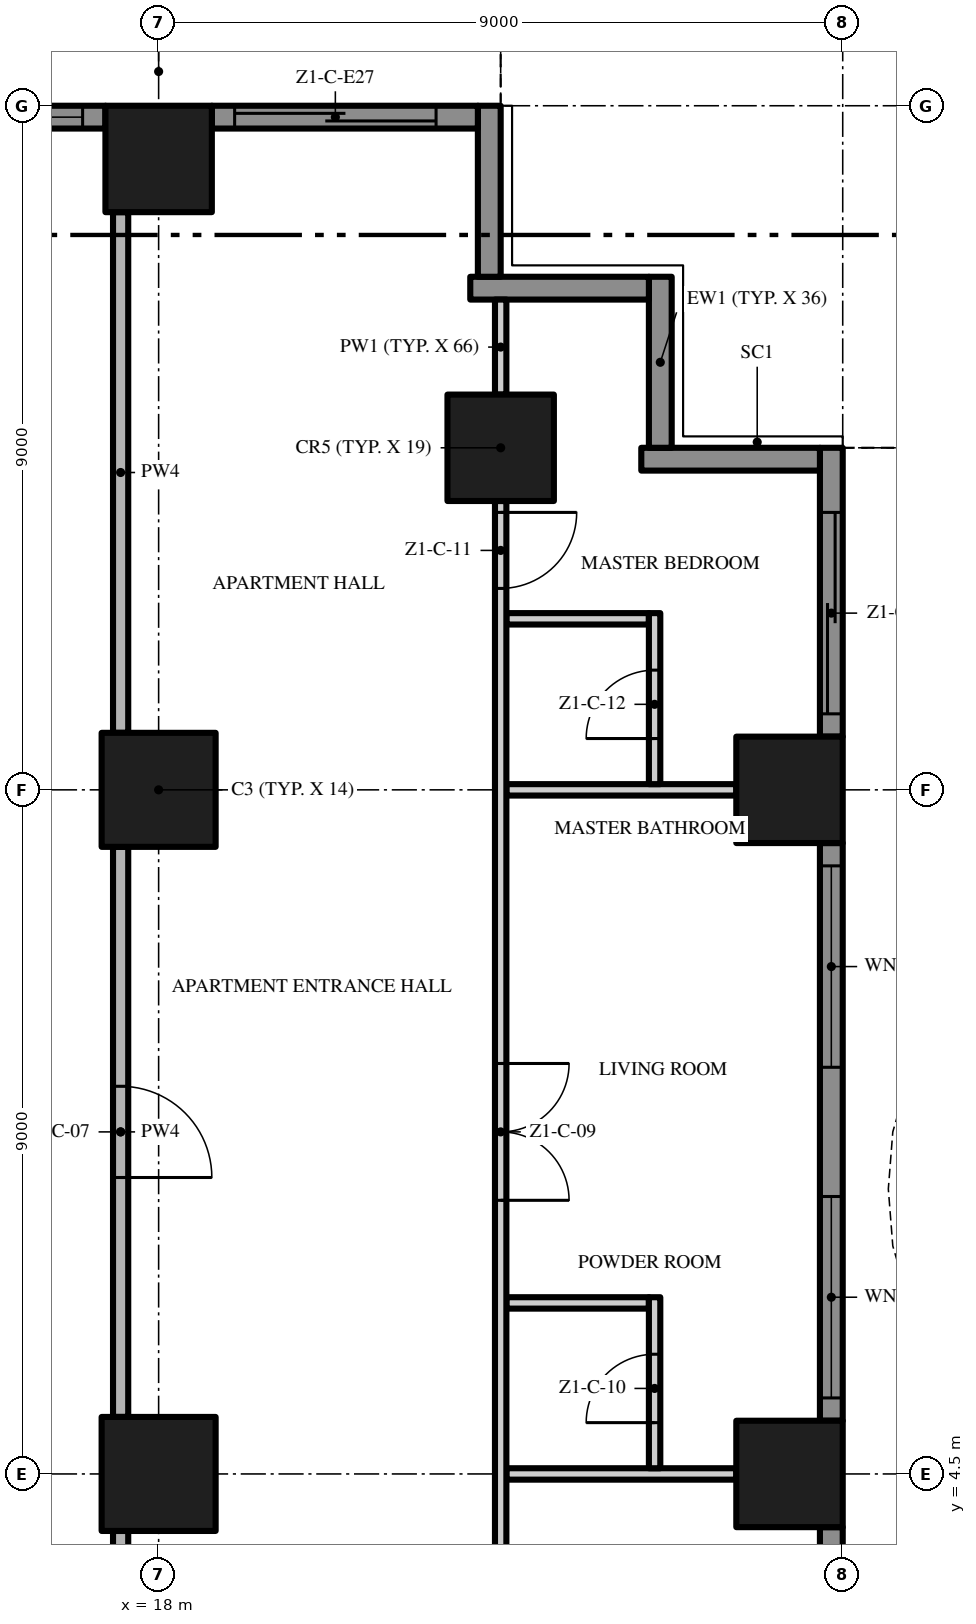
"""IFC4 building model, lengths in metres.
Left out: names, types, materials, properties, quantities, classifications, styles, units other than length and angle.
Written with IfcOpenShell. Run it as: python <this file> out.ifc"""

import sys

from ifc_helpers import new_model, si_unit, direction, frame, frame_2d, origin, origin_2d, place, context, subcontext, project, spatial, polyline, rectangle, outline, extrude, element, fill, save


model = new_model("IFC4")
c1 = context("Model", 3, precision=1e-05, world=origin(), true_north=direction((0.0, 1.0)))
c2 = subcontext(c1, "Body", "Model", "MODEL_VIEW")
j1 = project(units=[si_unit("LENGTHUNIT", "METRE"), si_unit("PLANEANGLEUNIT", "RADIAN")], contexts=[c1])
p1 = place(None, origin())
s1 = spatial("IfcSite", under=j1, at=p1, CompositionType="ELEMENT")
p2 = place(p1, origin())
s2 = spatial("IfcBuilding", under=s1, at=p2, CompositionType="ELEMENT")
p3 = place(p2, frame((0.0, 0.0, 45.4)))
s3 = spatial("IfcBuildingStorey", under=s2, at=p3, CompositionType="ELEMENT", Elevation=45.4)
p4 = place(p3, frame((18.0, 13.5, 0.0), z_axis=(0.0, 0.0, 1.0), x_axis=(1.0, 0.0, 0.0)))
e1 = element("IfcColumn", 1, at=p4, inside=s3, PredefinedType="COLUMN", context=c2, shape_type="SweptSolid", body=[
    extrude(rectangle(XDim=1.5, YDim=1.5, at=origin_2d()), origin(), (0.0, 0.0, 1.0), 3.5),
])
p5 = place(p3, frame((18.0, 21.8, 0.0), z_axis=(0.0, 0.0, 1.0), x_axis=(1.0, 0.0, 0.0)))
e2 = element("IfcColumn", 2, at=p5, inside=s3, PredefinedType="COLUMN", context=c2, shape_type="SweptSolid", body=[
    extrude(rectangle(XDim=1.4, YDim=1.4, at=origin_2d()), origin(), (0.0, 0.0, 1.0), 3.5),
])
p6 = place(p3, frame((18.0, 4.5, 0.0), z_axis=(0.0, 0.0, 1.0), x_axis=(1.0, 0.0, 0.0)))
e3 = element("IfcColumn", 3, at=p6, inside=s3, PredefinedType="COLUMN", context=c2, shape_type="SweptSolid", body=[
    extrude(rectangle(XDim=1.5, YDim=1.5, at=origin_2d()), origin(), (0.0, 0.0, 1.0), 3.5),
])
for number, where, z_axis, x_axis in (
    (4, (26.3, 13.5, 0.0), (0.0, 0.0, 1.0), (1.0, 0.0, 0.0)),
    (5, (22.5, 18.0, 0.0), (0.0, 0.0, 1.0), (1.0, 0.0, 0.0)),
    (6, (26.3, 4.5, 0.0), (0.0, 0.0, 1.0), (1.0, 0.0, 0.0)),
):
    element("IfcColumn", number, at=place(p3, frame(where, z_axis=z_axis, x_axis=x_axis)), inside=s3, PredefinedType="COLUMN", context=c2, shape_type="SweptSolid", body=[
        extrude(rectangle(XDim=1.4, YDim=1.4, at=origin_2d()), origin(), (0.0, 0.0, 1.0), 3.5),
    ])
p7 = place(p3, frame((26.85, 3.8, 0.0), z_axis=(0.0, 0.0, 1.0), x_axis=(0.0, -1.0, 0.0)))
e7 = element("IfcWall", 7, at=p7, inside=s3, PredefinedType="SOLIDWALL", context=c2, shape_type="SweptSolid", body=[
    extrude(rectangle(XDim=7.6, YDim=0.3, at=frame_2d((3.8, 0.0))), origin(), (0.0, 0.0, 1.0), 3.5),
])
p8 = place(p7, frame((4.65, 0.0, 0.45)))
e8 = element("IfcOpeningElement", 8, at=p8, cuts=e7, PredefinedType="OPENING", context=c2, shape_type="SweptSolid", body=[
    extrude(rectangle(XDim=2.65, YDim=2.65, at=frame_2d((1.325, 1.325))), frame((0.0, 0.16, 0.0), z_axis=(0.0, -1.0, 0.0), x_axis=(1.0, 0.0, 0.0)), (0.0, 0.0, 1.0), 0.32),
])
p9 = place(p7, frame((0.3, 0.0, 0.0)))
e9 = element("IfcOpeningElement", 9, at=p9, cuts=e7, PredefinedType="OPENING", context=c2, shape_type="SweptSolid", body=[
    extrude(rectangle(XDim=2.65, YDim=2.4, at=frame_2d((1.325, 1.2))), frame((0.0, 0.16, 0.0), z_axis=(0.0, -1.0, 0.0), x_axis=(1.0, 0.0, 0.0)), (0.0, 0.0, 1.0), 0.32),
])
p10 = place(p3, frame((26.85, 12.8, 0.0), z_axis=(0.0, 0.0, 1.0), x_axis=(0.0, -1.0, 0.0)))
e10 = element("IfcWall", 10, at=p10, inside=s3, PredefinedType="SOLIDWALL", context=c2, shape_type="SweptSolid", body=[
    extrude(rectangle(XDim=7.6, YDim=0.3, at=frame_2d((3.8, 0.0))), origin(), (0.0, 0.0, 1.0), 3.5),
])
p11 = place(p10, frame((4.65, 0.0, 0.45)))
e11 = element("IfcOpeningElement", 11, at=p11, cuts=e10, PredefinedType="OPENING", context=c2, shape_type="SweptSolid", body=[
    extrude(rectangle(XDim=2.65, YDim=2.65, at=frame_2d((1.325, 1.325))), frame((0.0, 0.16, 0.0), z_axis=(0.0, -1.0, 0.0), x_axis=(1.0, 0.0, 0.0)), (0.0, 0.0, 1.0), 0.32),
])
p12 = place(p10, frame((0.3, 0.0, 0.45)))
e12 = element("IfcOpeningElement", 12, at=p12, cuts=e10, PredefinedType="OPENING", context=c2, shape_type="SweptSolid", body=[
    extrude(rectangle(XDim=2.65, YDim=2.65, at=frame_2d((1.325, 1.325))), frame((0.0, 0.16, 0.0), z_axis=(0.0, -1.0, 0.0), x_axis=(1.0, 0.0, 0.0)), (0.0, 0.0, 1.0), 0.32),
])
p13 = place(p3, frame((26.85, 18.0, 0.0), z_axis=(0.0, 0.0, 1.0), x_axis=(0.0, -1.0, 0.0)))
e13 = element("IfcWall", 13, at=p13, inside=s3, PredefinedType="SOLIDWALL", context=c2, shape_type="SweptSolid", body=[
    extrude(rectangle(XDim=3.8, YDim=0.3, at=frame_2d((1.9, 0.0))), origin(), (0.0, 0.0, 1.0), 3.5),
])
p14 = place(p13, frame((0.85, 0.0, 0.0)))
e14 = element("IfcOpeningElement", 14, at=p14, cuts=e13, PredefinedType="OPENING", context=c2, shape_type="SweptSolid", body=[
    extrude(rectangle(XDim=2.65, YDim=2.4, at=frame_2d((1.325, 1.2))), frame((0.0, 0.16, 0.0), z_axis=(0.0, -1.0, 0.0), x_axis=(1.0, 0.0, 0.0)), (0.0, 0.0, 1.0), 0.32),
])
p15 = place(p3, frame((24.35, 17.85, 0.0), z_axis=(0.0, 0.0, 1.0), x_axis=(1.0, 0.0, 0.0)))
e15 = element("IfcWall", 15, at=p15, inside=s3, PredefinedType="SOLIDWALL", context=c2, shape_type="SweptSolid", body=[
    extrude(rectangle(XDim=2.35, YDim=0.3, at=frame_2d((1.175, 0.0))), origin(), (0.0, 0.0, 1.0), 3.5),
])
p16 = place(p3, frame((24.6, 20.25, 0.0), z_axis=(0.0, 0.0, 1.0), x_axis=(0.0, -1.0, 0.0)))
e16 = element("IfcWall", 16, at=p16, inside=s3, PredefinedType="SOLIDWALL", context=c2, shape_type="SweptSolid", body=[
    extrude(rectangle(XDim=2.25, YDim=0.3, at=frame_2d((1.125, 0.0))), origin(), (0.0, 0.0, 1.0), 3.5),
])
p17 = place(p3, frame((22.1, 20.1, 0.0), z_axis=(0.0, 0.0, 1.0), x_axis=(1.0, 0.0, 0.0)))
e17 = element("IfcWall", 17, at=p17, inside=s3, PredefinedType="SOLIDWALL", context=c2, shape_type="SweptSolid", body=[
    extrude(rectangle(XDim=2.35, YDim=0.3, at=frame_2d((1.175, 0.0))), origin(), (0.0, 0.0, 1.0), 3.5),
])
p18 = place(p3, frame((22.35, 22.5, 0.0), z_axis=(0.0, 0.0, 1.0), x_axis=(0.0, -1.0, 0.0)))
e18 = element("IfcWall", 18, at=p18, inside=s3, PredefinedType="SOLIDWALL", context=c2, shape_type="SweptSolid", body=[
    extrude(rectangle(XDim=2.25, YDim=0.3, at=frame_2d((1.125, 0.0))), origin(), (0.0, 0.0, 1.0), 3.5),
])
p19 = place(p3, frame((18.7, 22.35, 0.0), z_axis=(0.0, 0.0, 1.0), x_axis=(1.0, 0.0, 0.0)))
e19 = element("IfcWall", 19, at=p19, inside=s3, PredefinedType="SOLIDWALL", context=c2, shape_type="SweptSolid", body=[
    extrude(rectangle(XDim=3.5, YDim=0.3, at=frame_2d((1.75, 0.0))), origin(), (0.0, 0.0, 1.0), 3.5),
])
p20 = place(p19, frame((0.3, 0.0, 0.0)))
e20 = element("IfcOpeningElement", 20, at=p20, cuts=e19, PredefinedType="OPENING", context=c2, shape_type="SweptSolid", body=[
    extrude(rectangle(XDim=2.65, YDim=2.4, at=frame_2d((1.325, 1.2))), frame((0.0, 0.16, 0.0), z_axis=(0.0, -1.0, 0.0), x_axis=(1.0, 0.0, 0.0)), (0.0, 0.0, 1.0), 0.32),
])
p21 = place(p3, frame((13.5, 22.35, 0.0), z_axis=(0.0, 0.0, 1.0), x_axis=(1.0, 0.0, 0.0)))
e21 = element("IfcWall", 21, at=p21, inside=s3, PredefinedType="SOLIDWALL", context=c2, shape_type="SweptSolid", body=[
    extrude(rectangle(XDim=3.8, YDim=0.3, at=frame_2d((1.9, 0.0))), origin(), (0.0, 0.0, 1.0), 3.5),
])
p22 = place(p21, frame((0.85, 0.0, 0.45)))
e22 = element("IfcOpeningElement", 22, at=p22, cuts=e21, PredefinedType="OPENING", context=c2, shape_type="SweptSolid", body=[
    extrude(rectangle(XDim=2.65, YDim=2.65, at=frame_2d((1.325, 1.325))), frame((0.0, 0.16, 0.0), z_axis=(0.0, -1.0, 0.0), x_axis=(1.0, 0.0, 0.0)), (0.0, 0.0, 1.0), 0.32),
])
p23 = place(p3, origin())
e23 = element("IfcWall", 23, at=p23, inside=s3, PredefinedType="USERDEFINED", context=c2, shape_type="SweptSolid", body=[
    extrude(outline(polyline([(28.8, -18.0), (29.505, -16.5), (29.941, -15.0), (30.0, -14.25), (29.941, -13.5), (29.505, -12.0), (28.8, -10.5), (28.095, -9.0), (27.659, -7.5), (27.6, -6.75), (27.659, -6.0), (28.095, -4.5), (28.8, -3.0), (29.505, -1.5), (29.941, 0.0), (30.0, 0.75), (29.941, 1.5), (29.505, 3.0), (28.8, 4.5), (28.095, 6.0), (27.659, 7.5), (27.6, 8.25), (27.659, 9.0), (28.095, 10.5), (28.8, 12.0), (29.505, 13.5), (29.941, 15.0), (30.0, 15.75), (29.941, 16.5), (29.505, 18.0), (29.265, 17.93), (29.694, 16.455), (29.749, 15.75), (29.694, 15.045), (29.271, 13.589), (28.574, 12.106), (27.86, 10.589), (27.411, 9.045), (27.349, 8.25), (27.411, 7.455), (27.86, 5.911), (28.574, 4.394), (29.271, 2.911), (29.694, 1.455), (29.749, 0.75), (29.694, 0.045), (29.271, -1.411), (28.574, -2.894), (27.86, -4.411), (27.411, -5.955), (27.349, -6.75), (27.411, -7.545), (27.86, -9.089), (28.574, -10.606), (29.271, -12.089), (29.694, -13.545), (29.749, -14.25), (29.694, -14.955), (29.271, -16.411), (28.574, -17.894), (28.8, -18.0)])), origin(), (0.0, 0.0, 1.0), 0.9),
])
p24 = place(p3, frame((22.575, 4.5, 0.0), z_axis=(0.0, 0.0, 1.0), x_axis=(1.0, 0.0, 0.0)))
e24 = element("IfcWall", 24, at=p24, inside=s3, PredefinedType="PARTITIONING", context=c2, shape_type="SweptSolid", body=[
    extrude(rectangle(XDim=3.025, YDim=0.15, at=frame_2d((1.512, 0.0))), origin(), (0.0, 0.0, 1.0), 3.5),
])
p25 = place(p3, frame((22.575, 6.75, 0.0), z_axis=(0.0, 0.0, 1.0), x_axis=(1.0, 0.0, 0.0)))
e25 = element("IfcWall", 25, at=p25, inside=s3, PredefinedType="PARTITIONING", context=c2, shape_type="SweptSolid", body=[
    extrude(rectangle(XDim=1.875, YDim=0.15, at=frame_2d((0.938, 0.0))), origin(), (0.0, 0.0, 1.0), 3.5),
])
p26 = place(p3, frame((22.575, 13.5, 0.0), z_axis=(0.0, 0.0, 1.0), x_axis=(1.0, 0.0, 0.0)))
e26 = element("IfcWall", 26, at=p26, inside=s3, PredefinedType="PARTITIONING", context=c2, shape_type="SweptSolid", body=[
    extrude(rectangle(XDim=3.025, YDim=0.15, at=frame_2d((1.512, 0.0))), origin(), (0.0, 0.0, 1.0), 3.5),
])
p27 = place(p3, frame((22.575, 15.75, 0.0), z_axis=(0.0, 0.0, 1.0), x_axis=(1.0, 0.0, 0.0)))
e27 = element("IfcWall", 27, at=p27, inside=s3, PredefinedType="PARTITIONING", context=c2, shape_type="SweptSolid", body=[
    extrude(rectangle(XDim=1.875, YDim=0.15, at=frame_2d((0.938, 0.0))), origin(), (0.0, 0.0, 1.0), 3.5),
])
p28 = place(p3, frame((17.5, -0.2, 0.0), z_axis=(0.0, 0.0, 1.0), x_axis=(0.0, 1.0, 0.0)))
e28 = element("IfcWall", 28, at=p28, inside=s3, PredefinedType="PARTITIONING", context=c2, shape_type="SweptSolid", body=[
    extrude(rectangle(XDim=3.95, YDim=0.2, at=frame_2d((1.975, 0.0))), origin(), (0.0, 0.0, 1.0), 3.5),
])
p29 = place(p3, frame((17.5, 12.75, 0.0), z_axis=(0.0, 0.0, 1.0), x_axis=(0.0, -1.0, 0.0)))
e29 = element("IfcWall", 29, at=p29, inside=s3, PredefinedType="PARTITIONING", context=c2, shape_type="SweptSolid", body=[
    extrude(rectangle(XDim=7.5, YDim=0.2, at=frame_2d((3.75, 0.0))), origin(), (0.0, 0.0, 1.0), 3.5),
])
p30 = place(p29, frame((3.15, 0.0, 0.0)))
e30 = element("IfcOpeningElement", 30, at=p30, cuts=e29, PredefinedType="OPENING", context=c2, shape_type="SweptSolid", body=[
    extrude(rectangle(XDim=1.2, YDim=2.4, at=frame_2d((0.6, 1.2))), frame((0.0, 0.11, 0.0), z_axis=(0.0, -1.0, 0.0), x_axis=(1.0, 0.0, 0.0)), (0.0, 0.0, 1.0), 0.22),
])
p31 = place(p3, frame((17.5, 14.25, 0.0), z_axis=(0.0, 0.0, 1.0), x_axis=(0.0, 1.0, 0.0)))
e31 = element("IfcWall", 31, at=p31, inside=s3, PredefinedType="PARTITIONING", context=c2, shape_type="SweptSolid", body=[
    extrude(rectangle(XDim=6.85, YDim=0.2, at=frame_2d((3.425, 0.0))), origin(), (0.0, 0.0, 1.0), 3.5),
])
p32 = place(p3, frame((22.5, 17.3, 0.0), z_axis=(0.0, 0.0, 1.0), x_axis=(0.0, -1.0, 0.0)))
e32 = element("IfcWall", 32, at=p32, inside=s3, PredefinedType="PARTITIONING", context=c2, shape_type="SweptSolid", body=[
    extrude(rectangle(XDim=17.2, YDim=0.15, at=frame_2d((8.6, 0.0))), origin(), (0.0, 0.0, 1.0), 3.5),
])
p33 = place(p32, frame((14.55, 0.0, 0.0)))
e33 = element("IfcOpeningElement", 33, at=p33, cuts=e32, PredefinedType="OPENING", context=c2, shape_type="SweptSolid", body=[
    extrude(rectangle(XDim=1.0, YDim=2.4, at=frame_2d((0.5, 1.2))), frame((0.0, 0.085, 0.0), z_axis=(0.0, -1.0, 0.0), x_axis=(1.0, 0.0, 0.0)), (0.0, 0.0, 1.0), 0.17),
])
p34 = place(p32, frame((7.4, 0.0, 0.0)))
e34 = element("IfcOpeningElement", 34, at=p34, cuts=e32, PredefinedType="OPENING", context=c2, shape_type="SweptSolid", body=[
    extrude(rectangle(XDim=1.8, YDim=2.4, at=frame_2d((0.9, 1.2))), frame((0.0, 0.085, 0.0), z_axis=(0.0, -1.0, 0.0), x_axis=(1.0, 0.0, 0.0)), (0.0, 0.0, 1.0), 0.17),
])
p35 = place(p32, frame((0.15, 0.0, 0.0)))
e35 = element("IfcOpeningElement", 35, at=p35, cuts=e32, PredefinedType="OPENING", context=c2, shape_type="SweptSolid", body=[
    extrude(rectangle(XDim=1.0, YDim=2.4, at=frame_2d((0.5, 1.2))), frame((0.0, 0.085, 0.0), z_axis=(0.0, -1.0, 0.0), x_axis=(1.0, 0.0, 0.0)), (0.0, 0.0, 1.0), 0.17),
])
p36 = place(p3, frame((22.5, 18.7, 0.0), z_axis=(0.0, 0.0, 1.0), x_axis=(0.0, 1.0, 0.0)))
e36 = element("IfcWall", 36, at=p36, inside=s3, PredefinedType="PARTITIONING", context=c2, shape_type="SweptSolid", body=[
    extrude(rectangle(XDim=1.25, YDim=0.15, at=frame_2d((0.625, 0.0))), origin(), (0.0, 0.0, 1.0), 3.5),
])
p37 = place(p3, frame((24.525, 4.575, 0.0), z_axis=(0.0, 0.0, 1.0), x_axis=(0.0, 1.0, 0.0)))
e37 = element("IfcWall", 37, at=p37, inside=s3, PredefinedType="PARTITIONING", context=c2, shape_type="SweptSolid", body=[
    extrude(rectangle(XDim=2.25, YDim=0.15, at=frame_2d((1.125, 0.0))), origin(), (0.0, 0.0, 1.0), 3.5),
])
p38 = place(p37, frame((0.6, 0.0, 0.0)))
e38 = element("IfcOpeningElement", 38, at=p38, cuts=e37, PredefinedType="OPENING", context=c2, shape_type="SweptSolid", body=[
    extrude(rectangle(XDim=0.9, YDim=2.1, at=frame_2d((0.45, 1.05))), frame((0.0, 0.085, 0.0), z_axis=(0.0, -1.0, 0.0), x_axis=(1.0, 0.0, 0.0)), (0.0, 0.0, 1.0), 0.17),
])
p39 = place(p3, frame((24.525, 13.575, 0.0), z_axis=(0.0, 0.0, 1.0), x_axis=(0.0, 1.0, 0.0)))
e39 = element("IfcWall", 39, at=p39, inside=s3, PredefinedType="PARTITIONING", context=c2, shape_type="SweptSolid", body=[
    extrude(rectangle(XDim=2.25, YDim=0.15, at=frame_2d((1.125, 0.0))), origin(), (0.0, 0.0, 1.0), 3.5),
])
p40 = place(p39, frame((0.6, 0.0, 0.0)))
e40 = element("IfcOpeningElement", 40, at=p40, cuts=e39, PredefinedType="OPENING", context=c2, shape_type="SweptSolid", body=[
    extrude(rectangle(XDim=0.9, YDim=2.1, at=frame_2d((0.45, 1.05))), frame((0.0, 0.085, 0.0), z_axis=(0.0, -1.0, 0.0), x_axis=(1.0, 0.0, 0.0)), (0.0, 0.0, 1.0), 0.17),
])
p41 = place(p11, origin())
e41 = element("IfcWindow", 41, at=p41, inside=s3, PartitioningType="SINGLE_PANEL", PredefinedType="WINDOW", context=c2, shape_type="SweptSolid", body=[
    extrude(rectangle(XDim=2.65, YDim=2.65, at=frame_2d((1.325, 1.325))), frame((0.0, 0.03, 0.0), z_axis=(0.0, -1.0, 0.0), x_axis=(1.0, 0.0, 0.0)), (0.0, 0.0, 1.0), 0.06),
])
fill(e11, e41)
p42 = place(p12, origin())
e42 = element("IfcWindow", 42, at=p42, inside=s3, PartitioningType="SINGLE_PANEL", PredefinedType="WINDOW", context=c2, shape_type="SweptSolid", body=[
    extrude(rectangle(XDim=2.65, YDim=2.65, at=frame_2d((1.325, 1.325))), frame((0.0, 0.03, 0.0), z_axis=(0.0, -1.0, 0.0), x_axis=(1.0, 0.0, 0.0)), (0.0, 0.0, 1.0), 0.06),
])
fill(e12, e42)
p43 = place(p14, origin())
e43 = element("IfcDoor", 43, at=p43, inside=s3, OperationType="SINGLE_SWING_LEFT", PredefinedType="DOOR", context=c2, shape_type="SweptSolid", body=[
    extrude(rectangle(XDim=2.65, YDim=2.4, at=frame_2d((1.325, 1.2))), frame((0.0, 0.025, 0.0), z_axis=(0.0, -1.0, 0.0), x_axis=(1.0, 0.0, 0.0)), (0.0, 0.0, 1.0), 0.05),
])
fill(e14, e43)
p44 = place(p20, origin())
e44 = element("IfcDoor", 44, at=p44, inside=s3, OperationType="SINGLE_SWING_LEFT", PredefinedType="DOOR", context=c2, shape_type="SweptSolid", body=[
    extrude(rectangle(XDim=2.65, YDim=2.4, at=frame_2d((1.325, 1.2))), frame((0.0, 0.025, 0.0), z_axis=(0.0, -1.0, 0.0), x_axis=(1.0, 0.0, 0.0)), (0.0, 0.0, 1.0), 0.05),
])
fill(e20, e44)
p45 = place(p22, origin())
e45 = element("IfcWindow", 45, at=p45, inside=s3, PartitioningType="SINGLE_PANEL", PredefinedType="WINDOW", context=c2, shape_type="SweptSolid", body=[
    extrude(rectangle(XDim=2.65, YDim=2.65, at=frame_2d((1.325, 1.325))), frame((0.0, 0.03, 0.0), z_axis=(0.0, -1.0, 0.0), x_axis=(1.0, 0.0, 0.0)), (0.0, 0.0, 1.0), 0.06),
])
fill(e22, e45)
p46 = place(p30, origin())
e46 = element("IfcDoor", 46, at=p46, inside=s3, OperationType="SINGLE_SWING_RIGHT", PredefinedType="DOOR", context=c2, shape_type="SweptSolid", body=[
    extrude(rectangle(XDim=1.2, YDim=2.4, at=frame_2d((0.6, 1.2))), frame((0.0, 0.025, 0.0), z_axis=(0.0, -1.0, 0.0), x_axis=(1.0, 0.0, 0.0)), (0.0, 0.0, 1.0), 0.05),
])
fill(e30, e46)
p47 = place(p34, origin())
e47 = element("IfcDoor", 47, at=p47, inside=s3, OperationType="DOUBLE_DOOR_SINGLE_SWING", PredefinedType="DOOR", context=c2, shape_type="SweptSolid", body=[
    extrude(rectangle(XDim=1.8, YDim=2.4, at=frame_2d((0.9, 1.2))), frame((0.0, 0.025, 0.0), z_axis=(0.0, -1.0, 0.0), x_axis=(1.0, 0.0, 0.0)), (0.0, 0.0, 1.0), 0.05),
])
fill(e34, e47)
p48 = place(p38, origin())
e48 = element("IfcDoor", 48, at=p48, inside=s3, OperationType="SINGLE_SWING_LEFT", PredefinedType="DOOR", context=c2, shape_type="SweptSolid", body=[
    extrude(rectangle(XDim=0.9, YDim=2.1, at=frame_2d((0.45, 1.05))), frame((0.0, 0.025, 0.0), z_axis=(0.0, -1.0, 0.0), x_axis=(1.0, 0.0, 0.0)), (0.0, 0.0, 1.0), 0.05),
])
fill(e38, e48)
p49 = place(p35, origin())
e49 = element("IfcDoor", 49, at=p49, inside=s3, OperationType="SINGLE_SWING_LEFT", PredefinedType="DOOR", context=c2, shape_type="SweptSolid", body=[
    extrude(rectangle(XDim=1.0, YDim=2.4, at=frame_2d((0.5, 1.2))), frame((0.0, 0.025, 0.0), z_axis=(0.0, -1.0, 0.0), x_axis=(1.0, 0.0, 0.0)), (0.0, 0.0, 1.0), 0.05),
])
fill(e35, e49)
p50 = place(p40, origin())
e50 = element("IfcDoor", 50, at=p50, inside=s3, OperationType="SINGLE_SWING_LEFT", PredefinedType="DOOR", context=c2, shape_type="SweptSolid", body=[
    extrude(rectangle(XDim=0.9, YDim=2.1, at=frame_2d((0.45, 1.05))), frame((0.0, 0.025, 0.0), z_axis=(0.0, -1.0, 0.0), x_axis=(1.0, 0.0, 0.0)), (0.0, 0.0, 1.0), 0.05),
])
fill(e40, e50)
save(model, sys.argv[1])
